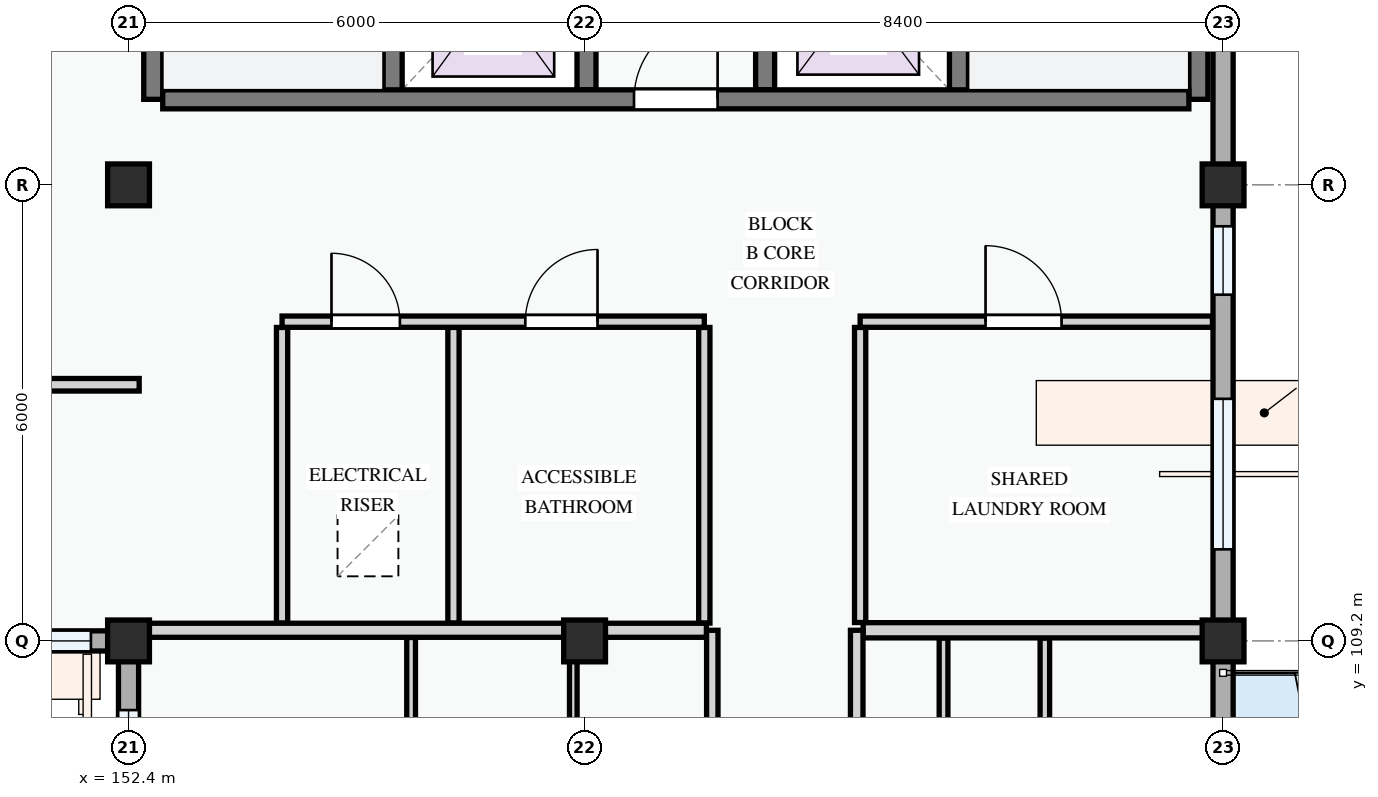
"""IFC4 building model, lengths in metres.
Left out: names, types, materials, properties, quantities, classifications, styles, units other than length and angle.
Written with IfcOpenShell. Run it as: python <this file> out.ifc"""

import sys

from ifc_helpers import new_model, si_unit, direction, frame, frame_2d, origin, origin_2d, place, context, subcontext, project, spatial, rectangle, extrude, element, fill, save


model = new_model("IFC4")
c1 = context("Model", 3, precision=1e-05, world=origin(), true_north=direction((0.0, 1.0)))
c2 = subcontext(c1, "Body", "Model", "MODEL_VIEW")
j1 = project(units=[si_unit("LENGTHUNIT", "METRE"), si_unit("PLANEANGLEUNIT", "RADIAN")], contexts=[c1])
p1 = place(None, origin())
s1 = spatial("IfcSite", under=j1, at=p1, CompositionType="ELEMENT")
p2 = place(p1, origin())
s2 = spatial("IfcBuilding", under=s1, at=p2, CompositionType="ELEMENT")
p3 = place(p2, frame((0.0, 0.0, 31.2)))
s3 = spatial("IfcBuildingStorey", under=s2, at=p3, CompositionType="ELEMENT", Elevation=31.2)
for number, where, z_axis, x_axis in (
    (1, (152.4, 109.2, 0.0), (0.0, 0.0, 1.0), (1.0, 0.0, 0.0)),
    (2, (152.4, 115.2, 0.0), (0.0, 0.0, 1.0), (1.0, 0.0, 0.0)),
    (3, (158.4, 109.2, 0.0), (0.0, 0.0, 1.0), (1.0, 0.0, 0.0)),
    (4, (166.8, 109.2, 0.0), (0.0, 0.0, 1.0), (1.0, 0.0, 0.0)),
    (5, (166.8, 115.2, 0.0), (0.0, 0.0, 1.0), (1.0, 0.0, 0.0)),
):
    element("IfcColumn", number, at=place(p3, frame(where, z_axis=z_axis, x_axis=x_axis)), inside=s3, PredefinedType="COLUMN", context=c2, shape_type="SweptSolid", body=[
        extrude(rectangle(XDim=0.55, YDim=0.55, at=origin_2d()), origin(), (0.0, 0.0, 1.0), 3.3),
    ])
p4 = place(p3, frame((166.8, 109.2, 0.0), z_axis=(0.0, 0.0, 1.0), x_axis=(0.0, 1.0, 0.0)))
e6 = element("IfcWall", 6, at=p4, inside=s3, PredefinedType="STANDARD", context=c2, shape_type="SweptSolid", body=[
    extrude(rectangle(XDim=6.0, YDim=0.265, at=frame_2d((3.0, 0.0))), origin(), (0.0, 0.0, 1.0), 2.575),
])
p5 = place(p4, frame((1.205, 0.0, 0.78)))
e7 = element("IfcOpeningElement", 7, at=p5, cuts=e6, PredefinedType="OPENING", context=c2, shape_type="SweptSolid", body=[
    extrude(rectangle(XDim=1.98, YDim=1.5, at=frame_2d((0.99, 0.75))), frame((0.0, 0.143, 0.0), z_axis=(0.0, -1.0, 0.0), x_axis=(1.0, 0.0, 0.0)), (0.0, 0.0, 1.0), 0.285),
])
p6 = place(p4, frame((4.555, 0.0, 0.78)))
e8 = element("IfcOpeningElement", 8, at=p6, cuts=e6, PredefinedType="OPENING", context=c2, shape_type="SweptSolid", body=[
    extrude(rectangle(XDim=0.9, YDim=1.2, at=frame_2d((0.45, 0.6))), frame((0.0, 0.143, 0.0), z_axis=(0.0, -1.0, 0.0), x_axis=(1.0, 0.0, 0.0)), (0.0, 0.0, 1.0), 0.285),
])
p7 = place(p3, frame((166.8, 115.2, 0.0), z_axis=(0.0, 0.0, 1.0), x_axis=(0.0, 1.0, 0.0)))
e9 = element("IfcWall", 9, at=p7, inside=s3, PredefinedType="STANDARD", context=c2, shape_type="SweptSolid", body=[
    extrude(rectangle(XDim=8.4, YDim=0.265, at=frame_2d((4.2, 0.0))), origin(), (0.0, 0.0, 1.0), 2.425),
])
p8 = place(p7, frame((1.911, 0.0, 0.78)))
e10 = element("IfcOpeningElement", 10, at=p8, cuts=e9, PredefinedType="OPENING", context=c2, shape_type="SweptSolid", body=[
    extrude(rectangle(XDim=2.04, YDim=1.46, at=frame_2d((1.02, 0.73))), frame((0.0, 0.143, 0.0), z_axis=(0.0, -1.0, 0.0), x_axis=(1.0, 0.0, 0.0)), (0.0, 0.0, 1.0), 0.285),
])
p9 = place(p7, frame((5.214, 0.0, 0.78)))
e11 = element("IfcOpeningElement", 11, at=p9, cuts=e9, PredefinedType="OPENING", context=c2, shape_type="SweptSolid", body=[
    extrude(rectangle(XDim=2.38, YDim=1.48, at=frame_2d((1.19, 0.74))), frame((0.0, 0.143, 0.0), z_axis=(0.0, -1.0, 0.0), x_axis=(1.0, 0.0, 0.0)), (0.0, 0.0, 1.0), 0.285),
])
p10 = place(p3, frame((144.0, 109.2, 0.0), z_axis=(0.0, 0.0, 1.0), x_axis=(1.0, 0.0, 0.0)))
e12 = element("IfcWall", 12, at=p10, inside=s3, PredefinedType="STANDARD", context=c2, shape_type="SweptSolid", body=[
    extrude(rectangle(XDim=8.4, YDim=0.265, at=frame_2d((4.2, 0.0))), origin(), (0.0, 0.0, 1.0), 2.375),
])
p11 = place(p10, frame((1.04, 0.0, 0.78)))
e13 = element("IfcOpeningElement", 13, at=p11, cuts=e12, PredefinedType="OPENING", context=c2, shape_type="SweptSolid", body=[
    extrude(rectangle(XDim=1.3, YDim=1.4, at=frame_2d((0.65, 0.7))), frame((0.0, 0.143, 0.0), z_axis=(0.0, -1.0, 0.0), x_axis=(1.0, 0.0, 0.0)), (0.0, 0.0, 1.0), 0.285),
])
p12 = place(p10, frame((3.925, 0.0, 0.78)))
e14 = element("IfcOpeningElement", 14, at=p12, cuts=e12, PredefinedType="OPENING", context=c2, shape_type="SweptSolid", body=[
    extrude(rectangle(XDim=1.25, YDim=1.3, at=frame_2d((0.625, 0.65))), frame((0.0, 0.143, 0.0), z_axis=(0.0, -1.0, 0.0), x_axis=(1.0, 0.0, 0.0)), (0.0, 0.0, 1.0), 0.285),
])
p13 = place(p10, frame((6.355, 0.0, 0.78)))
e15 = element("IfcOpeningElement", 15, at=p13, cuts=e12, PredefinedType="OPENING", context=c2, shape_type="SweptSolid", body=[
    extrude(rectangle(XDim=1.55, YDim=1.4, at=frame_2d((0.775, 0.7))), frame((0.0, 0.143, 0.0), z_axis=(0.0, -1.0, 0.0), x_axis=(1.0, 0.0, 0.0)), (0.0, 0.0, 1.0), 0.285),
])
p14 = place(p3, frame((152.4, 109.2, 0.0), z_axis=(0.0, 0.0, 1.0), x_axis=(0.0, -1.0, 0.0)))
e16 = element("IfcWall", 16, at=p14, inside=s3, PredefinedType="STANDARD", context=c2, shape_type="SweptSolid", body=[
    extrude(rectangle(XDim=8.4, YDim=0.265, at=frame_2d((4.2, 0.0))), origin(), (0.0, 0.0, 1.0), 2.425),
])
p15 = place(p14, frame((0.91, 0.0, 0.78)))
e17 = element("IfcOpeningElement", 17, at=p15, cuts=e16, PredefinedType="OPENING", context=c2, shape_type="SweptSolid", body=[
    extrude(rectangle(XDim=1.05, YDim=1.2, at=frame_2d((0.525, 0.6))), frame((0.0, 0.143, 0.0), z_axis=(0.0, -1.0, 0.0), x_axis=(1.0, 0.0, 0.0)), (0.0, 0.0, 1.0), 0.285),
])
p16 = place(p14, frame((3.045, 0.0, 0.78)))
e18 = element("IfcOpeningElement", 18, at=p16, cuts=e16, PredefinedType="OPENING", context=c2, shape_type="SweptSolid", body=[
    extrude(rectangle(XDim=1.48, YDim=1.52, at=frame_2d((0.74, 0.76))), frame((0.0, 0.143, 0.0), z_axis=(0.0, -1.0, 0.0), x_axis=(1.0, 0.0, 0.0)), (0.0, 0.0, 1.0), 0.285),
])
p17 = place(p14, frame((5.995, 0.0, 0.78)))
e19 = element("IfcOpeningElement", 19, at=p17, cuts=e16, PredefinedType="OPENING", context=c2, shape_type="SweptSolid", body=[
    extrude(rectangle(XDim=1.25, YDim=1.45, at=frame_2d((0.625, 0.725))), frame((0.0, 0.143, 0.0), z_axis=(0.0, -1.0, 0.0), x_axis=(1.0, 0.0, 0.0)), (0.0, 0.0, 1.0), 0.285),
])
p18 = place(p3, frame((166.8, 100.8, 0.0), z_axis=(0.0, 0.0, 1.0), x_axis=(0.0, 1.0, 0.0)))
e20 = element("IfcWall", 20, at=p18, inside=s3, PredefinedType="STANDARD", context=c2, shape_type="SweptSolid", body=[
    extrude(rectangle(XDim=8.4, YDim=0.265, at=frame_2d((4.2, 0.0))), origin(), (0.0, 0.0, 1.0), 2.425),
])
p19 = place(p18, frame((3.493, 0.0, 0.0)))
e21 = element("IfcOpeningElement", 21, at=p19, cuts=e20, PredefinedType="OPENING", context=c2, shape_type="SweptSolid", body=[
    extrude(rectangle(XDim=1.05, YDim=2.15, at=frame_2d((0.525, 1.075))), frame((0.0, 0.143, 0.0), z_axis=(0.0, -1.0, 0.0), x_axis=(1.0, 0.0, 0.0)), (0.0, 0.0, 1.0), 0.285),
])
p20 = place(p18, frame((1.152, 0.0, 0.78)))
e22 = element("IfcOpeningElement", 22, at=p20, cuts=e20, PredefinedType="OPENING", context=c2, shape_type="SweptSolid", body=[
    extrude(rectangle(XDim=1.05, YDim=1.2, at=frame_2d((0.525, 0.6))), frame((0.0, 0.143, 0.0), z_axis=(0.0, -1.0, 0.0), x_axis=(1.0, 0.0, 0.0)), (0.0, 0.0, 1.0), 0.285),
])
p21 = place(p18, frame((5.492, 0.0, 0.78)))
e23 = element("IfcOpeningElement", 23, at=p21, cuts=e20, PredefinedType="OPENING", context=c2, shape_type="SweptSolid", body=[
    extrude(rectangle(XDim=1.82, YDim=1.46, at=frame_2d((0.91, 0.73))), frame((0.0, 0.143, 0.0), z_axis=(0.0, -1.0, 0.0), x_axis=(1.0, 0.0, 0.0)), (0.0, 0.0, 1.0), 0.285),
])
p22 = place(p3, frame((155.875, 123.25, 0.0), z_axis=(0.0, 0.0, 1.0), x_axis=(0.0, -1.0, 0.0)))
e24 = element("IfcWall", 24, at=p22, inside=s3, PredefinedType="SHEAR", context=c2, shape_type="SweptSolid", body=[
    extrude(rectangle(XDim=6.925, YDim=0.25, at=frame_2d((3.462, 0.0))), origin(), (0.0, 0.0, 1.0), 3.0),
])
p23 = place(p22, frame((0.35, 0.0, 0.0)))
e25 = element("IfcOpeningElement", 25, at=p23, cuts=e24, PredefinedType="OPENING", context=c2, shape_type="SweptSolid", body=[
    extrude(rectangle(XDim=0.95, YDim=2.1, at=frame_2d((0.475, 1.05))), frame((0.0, 0.135, 0.0), z_axis=(0.0, -1.0, 0.0), x_axis=(1.0, 0.0, 0.0)), (0.0, 0.0, 1.0), 0.27),
])
p24 = place(p3, frame((152.725, 123.4, 0.0), z_axis=(0.0, 0.0, 1.0), x_axis=(0.0, -1.0, 0.0)))
e26 = element("IfcWall", 26, at=p24, inside=s3, PredefinedType="SHEAR", context=c2, shape_type="SweptSolid", body=[
    extrude(rectangle(XDim=7.075, YDim=0.25, at=frame_2d((3.538, 0.0))), origin(), (0.0, 0.0, 1.0), 3.0),
])
p25 = place(p3, frame((166.475, 123.25, 0.0), z_axis=(0.0, 0.0, 1.0), x_axis=(0.0, -1.0, 0.0)))
e27 = element("IfcWall", 27, at=p25, inside=s3, PredefinedType="SHEAR", context=c2, shape_type="SweptSolid", body=[
    extrude(rectangle(XDim=6.925, YDim=0.25, at=frame_2d((3.462, 0.0))), origin(), (0.0, 0.0, 1.0), 3.0),
])
p26 = place(p3, frame((163.325, 123.25, 0.0), z_axis=(0.0, 0.0, 1.0), x_axis=(0.0, -1.0, 0.0)))
e28 = element("IfcWall", 28, at=p26, inside=s3, PredefinedType="SHEAR", context=c2, shape_type="SweptSolid", body=[
    extrude(rectangle(XDim=6.925, YDim=0.25, at=frame_2d((3.462, 0.0))), origin(), (0.0, 0.0, 1.0), 3.0),
])
p27 = place(p26, frame((0.35, 0.0, 0.0)))
e29 = element("IfcOpeningElement", 29, at=p27, cuts=e28, PredefinedType="OPENING", context=c2, shape_type="SweptSolid", body=[
    extrude(rectangle(XDim=0.95, YDim=2.1, at=frame_2d((0.475, 1.05))), frame((0.0, 0.135, 0.0), z_axis=(0.0, -1.0, 0.0), x_axis=(1.0, 0.0, 0.0)), (0.0, 0.0, 1.0), 0.27),
])
for number, where, z_axis, x_axis in (
    (30, (158.425, 118.875, 0.0), (0.0, 0.0, 1.0), (0.0, -1.0, 0.0)),
    (31, (160.775, 118.875, 0.0), (0.0, 0.0, 1.0), (0.0, -1.0, 0.0)),
):
    element("IfcWall", number, at=place(p3, frame(where, z_axis=z_axis, x_axis=x_axis)), inside=s3, PredefinedType="SHEAR", context=c2, shape_type="SweptSolid", body=[
        extrude(rectangle(XDim=2.425, YDim=0.25, at=frame_2d((1.212, 0.0))), origin(), (0.0, 0.0, 1.0), 3.0),
    ])
p28 = place(p3, frame((152.85, 116.325, 0.0), z_axis=(0.0, 0.0, 1.0), x_axis=(1.0, 0.0, 0.0)))
e32 = element("IfcWall", 32, at=p28, inside=s3, PredefinedType="SHEAR", context=c2, shape_type="SweptSolid", body=[
    extrude(rectangle(XDim=13.5, YDim=0.25, at=frame_2d((6.75, 0.0))), origin(), (0.0, 0.0, 1.0), 3.0),
])
p29 = place(p28, frame((6.2, 0.0, 0.0)))
e33 = element("IfcOpeningElement", 33, at=p29, cuts=e32, PredefinedType="OPENING", context=c2, shape_type="SweptSolid", body=[
    extrude(rectangle(XDim=1.1, YDim=2.15, at=frame_2d((0.55, 1.075))), frame((0.0, 0.135, 0.0), z_axis=(0.0, -1.0, 0.0), x_axis=(1.0, 0.0, 0.0)), (0.0, 0.0, 1.0), 0.27),
])
for number, where, z_axis, x_axis in (
    (34, (154.42, 113.324, 0.0), (0.0, 0.0, 1.0), (0.0, -1.0, 0.0)),
    (35, (156.675, 113.324, 0.0), (0.0, 0.0, 1.0), (0.0, -1.0, 0.0)),
    (36, (159.975, 113.324, 0.0), (0.0, 0.0, 1.0), (0.0, -1.0, 0.0)),
):
    element("IfcWall", number, at=place(p3, frame(where, z_axis=z_axis, x_axis=x_axis)), inside=s3, PredefinedType="PARTITIONING", context=c2, shape_type="SweptSolid", body=[
        extrude(rectangle(XDim=3.889, YDim=0.148, at=frame_2d((1.945, 0.0))), origin(), (0.0, 0.0, 1.0), 3.0),
    ])
p30 = place(p3, frame((162.025, 113.324, 0.0), z_axis=(0.0, 0.0, 1.0), x_axis=(0.0, -1.0, 0.0)))
e37 = element("IfcWall", 37, at=p30, inside=s3, PredefinedType="PARTITIONING", context=c2, shape_type="SweptSolid", body=[
    extrude(rectangle(XDim=3.882, YDim=0.148, at=frame_2d((1.941, 0.0))), origin(), (0.0, 0.0, 1.0), 3.0),
])
p31 = place(p3, frame((154.42, 113.4, 0.0), z_axis=(0.0, 0.0, 1.0), x_axis=(1.0, 0.0, 0.0)))
e38 = element("IfcWall", 38, at=p31, inside=s3, PredefinedType="PARTITIONING", context=c2, shape_type="SweptSolid", body=[
    extrude(rectangle(XDim=5.555, YDim=0.148, at=frame_2d((2.778, 0.0))), origin(), (0.0, 0.0, 1.0), 3.0),
])
p32 = place(p31, frame((0.65, 0.0, 0.0)))
e39 = element("IfcOpeningElement", 39, at=p32, cuts=e38, PredefinedType="OPENING", context=c2, shape_type="SweptSolid", body=[
    extrude(rectangle(XDim=0.9, YDim=2.1, at=frame_2d((0.45, 1.05))), frame((0.0, 0.084, 0.0), z_axis=(0.0, -1.0, 0.0), x_axis=(1.0, 0.0, 0.0)), (0.0, 0.0, 1.0), 0.168),
])
p33 = place(p31, frame((3.2, 0.0, 0.0)))
e40 = element("IfcOpeningElement", 40, at=p33, cuts=e38, PredefinedType="OPENING", context=c2, shape_type="SweptSolid", body=[
    extrude(rectangle(XDim=0.95, YDim=2.1, at=frame_2d((0.475, 1.05))), frame((0.0, 0.084, 0.0), z_axis=(0.0, -1.0, 0.0), x_axis=(1.0, 0.0, 0.0)), (0.0, 0.0, 1.0), 0.168),
])
p34 = place(p3, frame((162.025, 113.4, 0.0), z_axis=(0.0, 0.0, 1.0), x_axis=(1.0, 0.0, 0.0)))
e41 = element("IfcWall", 41, at=p34, inside=s3, PredefinedType="PARTITIONING", context=c2, shape_type="SweptSolid", body=[
    extrude(rectangle(XDim=4.635, YDim=0.148, at=frame_2d((2.317, 0.0))), origin(), (0.0, 0.0, 1.0), 3.0),
])
p35 = place(p34, frame((1.65, 0.0, 0.0)))
e42 = element("IfcOpeningElement", 42, at=p35, cuts=e41, PredefinedType="OPENING", context=c2, shape_type="SweptSolid", body=[
    extrude(rectangle(XDim=1.0, YDim=2.15, at=frame_2d((0.5, 1.075))), frame((0.0, 0.084, 0.0), z_axis=(0.0, -1.0, 0.0), x_axis=(1.0, 0.0, 0.0)), (0.0, 0.0, 1.0), 0.168),
])
p36 = place(p3, frame((150.127, 112.57, 0.0), z_axis=(0.0, 0.0, 1.0), x_axis=(1.0, 0.0, 0.0)))
e43 = element("IfcWall", 43, at=p36, inside=s3, PredefinedType="PARTITIONING", context=c2, shape_type="SweptSolid", body=[
    extrude(rectangle(XDim=2.413, YDim=0.165, at=frame_2d((1.207, 0.0))), origin(), (0.0, 0.0, 1.0), 3.0),
])
p37 = place(p3, frame((156.118, 104.235, 0.0), z_axis=(0.0, 0.0, 1.0), x_axis=(0.0, 1.0, 0.0)))
e44 = element("IfcWall", 44, at=p37, inside=s3, PredefinedType="PARTITIONING", context=c2, shape_type="SweptSolid", body=[
    extrude(rectangle(XDim=5.011, YDim=0.115, at=frame_2d((2.505, 0.0))), origin(), (0.0, 0.0, 1.0), 3.0),
])
p38 = place(p3, frame((158.251, 104.235, 0.0), z_axis=(0.0, 0.0, 1.0), x_axis=(0.0, 1.0, 0.0)))
e45 = element("IfcWall", 45, at=p38, inside=s3, PredefinedType="PARTITIONING", context=c2, shape_type="SweptSolid", body=[
    extrude(rectangle(XDim=5.011, YDim=0.1, at=frame_2d((2.505, 0.0))), origin(), (0.0, 0.0, 1.0), 2.425),
])
p39 = place(p3, frame((164.455, 104.035, 0.0), z_axis=(0.0, 0.0, 1.0), x_axis=(0.0, 1.0, 0.0)))
e46 = element("IfcWall", 46, at=p39, inside=s3, PredefinedType="PARTITIONING", context=c2, shape_type="SweptSolid", body=[
    extrude(rectangle(XDim=5.203, YDim=0.125, at=frame_2d((2.602, 0.0))), origin(), (0.0, 0.0, 1.0), 3.0),
])
p40 = place(p3, frame((163.122, 104.035, 0.0), z_axis=(0.0, 0.0, 1.0), x_axis=(0.0, 1.0, 0.0)))
e47 = element("IfcWall", 47, at=p40, inside=s3, PredefinedType="PARTITIONING", context=c2, shape_type="SweptSolid", body=[
    extrude(rectangle(XDim=5.203, YDim=0.115, at=frame_2d((2.602, 0.0))), origin(), (0.0, 0.0, 1.0), 3.0),
])
p41 = place(p3, frame((152.46, 109.34, 0.0), z_axis=(0.0, 0.0, 1.0), x_axis=(1.0, 0.0, 0.0)))
e48 = element("IfcWall", 48, at=p41, inside=s3, PredefinedType="PARTITIONING", context=c2, shape_type="SweptSolid", body=[
    extrude(rectangle(XDim=7.543, YDim=0.185, at=frame_2d((3.771, 0.0))), origin(), (0.0, 0.0, 1.0), 2.375),
])
p42 = place(p3, frame((162.064, 109.34, 0.0), z_axis=(0.0, 0.0, 1.0), x_axis=(1.0, 0.0, 0.0)))
e49 = element("IfcWall", 49, at=p42, inside=s3, PredefinedType="PARTITIONING", context=c2, shape_type="SweptSolid", body=[
    extrude(rectangle(XDim=4.601, YDim=0.2, at=frame_2d((2.301, 0.0))), origin(), (0.0, 0.0, 1.0), 2.375),
])
p43 = place(p3, frame((160.08, 80.46, 0.0), z_axis=(0.0, 0.0, 1.0), x_axis=(0.0, 1.0, 0.0)))
e50 = element("IfcWall", 50, at=p43, inside=s3, PredefinedType="PARTITIONING", context=c2, shape_type="SweptSolid", body=[
    extrude(rectangle(XDim=28.88, YDim=0.15, at=frame_2d((14.44, 0.0))), origin(), (0.0, 0.0, 1.0), 3.0),
])
p44 = place(p43, frame((2.484, 0.0, 0.0)))
e51 = element("IfcOpeningElement", 51, at=p44, cuts=e50, PredefinedType="OPENING", context=c2, shape_type="SweptSolid", body=[
    extrude(rectangle(XDim=0.92, YDim=2.1, at=frame_2d((0.46, 1.05))), frame((0.0, 0.085, 0.0), z_axis=(0.0, -1.0, 0.0), x_axis=(1.0, 0.0, 0.0)), (0.0, 0.0, 1.0), 0.17),
])
p45 = place(p43, frame((10.07, 0.0, 0.0)))
e52 = element("IfcOpeningElement", 52, at=p45, cuts=e50, PredefinedType="OPENING", context=c2, shape_type="SweptSolid", body=[
    extrude(rectangle(XDim=0.96, YDim=2.12, at=frame_2d((0.48, 1.06))), frame((0.0, 0.085, 0.0), z_axis=(0.0, -1.0, 0.0), x_axis=(1.0, 0.0, 0.0)), (0.0, 0.0, 1.0), 0.17),
])
p46 = place(p43, frame((22.5, 0.0, 0.0)))
e53 = element("IfcOpeningElement", 53, at=p46, cuts=e50, PredefinedType="OPENING", context=c2, shape_type="SweptSolid", body=[
    extrude(rectangle(XDim=0.92, YDim=2.1, at=frame_2d((0.46, 1.05))), frame((0.0, 0.085, 0.0), z_axis=(0.0, -1.0, 0.0), x_axis=(1.0, 0.0, 0.0)), (0.0, 0.0, 1.0), 0.17),
])
p47 = place(p3, frame((161.98, 80.46, 0.0), z_axis=(0.0, 0.0, 1.0), x_axis=(0.0, 1.0, 0.0)))
e54 = element("IfcWall", 54, at=p47, inside=s3, PredefinedType="PARTITIONING", context=c2, shape_type="SweptSolid", body=[
    extrude(rectangle(XDim=28.88, YDim=0.165, at=frame_2d((14.44, 0.0))), origin(), (0.0, 0.0, 1.0), 3.0),
])
p48 = place(p47, frame((2.487, 0.0, 0.0)))
e55 = element("IfcOpeningElement", 55, at=p48, cuts=e54, PredefinedType="OPENING", context=c2, shape_type="SweptSolid", body=[
    extrude(rectangle(XDim=0.92, YDim=2.1, at=frame_2d((0.46, 1.05))), frame((0.0, 0.093, 0.0), z_axis=(0.0, -1.0, 0.0), x_axis=(1.0, 0.0, 0.0)), (0.0, 0.0, 1.0), 0.185),
])
p49 = place(p47, frame((10.07, 0.0, 0.0)))
e56 = element("IfcOpeningElement", 56, at=p49, cuts=e54, PredefinedType="OPENING", context=c2, shape_type="SweptSolid", body=[
    extrude(rectangle(XDim=0.92, YDim=2.1, at=frame_2d((0.46, 1.05))), frame((0.0, 0.093, 0.0), z_axis=(0.0, -1.0, 0.0), x_axis=(1.0, 0.0, 0.0)), (0.0, 0.0, 1.0), 0.185),
])
p50 = place(p47, frame((22.293, 0.0, 0.0)))
e57 = element("IfcOpeningElement", 57, at=p50, cuts=e54, PredefinedType="OPENING", context=c2, shape_type="SweptSolid", body=[
    extrude(rectangle(XDim=0.92, YDim=2.1, at=frame_2d((0.46, 1.05))), frame((0.0, 0.093, 0.0), z_axis=(0.0, -1.0, 0.0), x_axis=(1.0, 0.0, 0.0)), (0.0, 0.0, 1.0), 0.185),
])
p51 = place(p5, origin())
e58 = element("IfcWindow", 58, at=p51, inside=s3, PartitioningType="DOUBLE_PANEL_VERTICAL", PredefinedType="WINDOW", context=c2, shape_type="SweptSolid", body=[
    extrude(rectangle(XDim=1.98, YDim=1.5, at=frame_2d((0.99, 0.75))), frame((0.0, 0.03, 0.0), z_axis=(0.0, -1.0, 0.0), x_axis=(1.0, 0.0, 0.0)), (0.0, 0.0, 1.0), 0.06),
])
fill(e7, e58)
p52 = place(p6, origin())
e59 = element("IfcWindow", 59, at=p52, inside=s3, PartitioningType="SINGLE_PANEL", PredefinedType="WINDOW", context=c2, shape_type="SweptSolid", body=[
    extrude(rectangle(XDim=0.9, YDim=1.2, at=frame_2d((0.45, 0.6))), frame((0.0, 0.03, 0.0), z_axis=(0.0, -1.0, 0.0), x_axis=(1.0, 0.0, 0.0)), (0.0, 0.0, 1.0), 0.06),
])
fill(e8, e59)
p53 = place(p13, origin())
e60 = element("IfcWindow", 60, at=p53, inside=s3, PartitioningType="SINGLE_PANEL", PredefinedType="WINDOW", context=c2, shape_type="SweptSolid", body=[
    extrude(rectangle(XDim=1.55, YDim=1.4, at=frame_2d((0.775, 0.7))), frame((0.0, 0.03, 0.0), z_axis=(0.0, -1.0, 0.0), x_axis=(1.0, 0.0, 0.0)), (0.0, 0.0, 1.0), 0.06),
])
fill(e15, e60)
p54 = place(p15, origin())
e61 = element("IfcWindow", 61, at=p54, inside=s3, PartitioningType="SINGLE_PANEL", PredefinedType="WINDOW", context=c2, shape_type="SweptSolid", body=[
    extrude(rectangle(XDim=1.05, YDim=1.2, at=frame_2d((0.525, 0.6))), frame((0.0, 0.03, 0.0), z_axis=(0.0, -1.0, 0.0), x_axis=(1.0, 0.0, 0.0)), (0.0, 0.0, 1.0), 0.06),
])
fill(e17, e61)
p55 = place(p29, origin())
e62 = element("IfcDoor", 62, at=p55, inside=s3, OperationType="SINGLE_SWING_RIGHT", PredefinedType="DOOR", context=c2, shape_type="SweptSolid", body=[
    extrude(rectangle(XDim=1.1, YDim=2.15, at=frame_2d((0.55, 1.075))), frame((0.0, 0.025, 0.0), z_axis=(0.0, -1.0, 0.0), x_axis=(1.0, 0.0, 0.0)), (0.0, 0.0, 1.0), 0.05),
])
fill(e33, e62)
p56 = place(p32, origin())
e63 = element("IfcDoor", 63, at=p56, inside=s3, OperationType="SINGLE_SWING_LEFT", PredefinedType="DOOR", context=c2, shape_type="SweptSolid", body=[
    extrude(rectangle(XDim=0.9, YDim=2.1, at=frame_2d((0.45, 1.05))), frame((0.0, 0.025, 0.0), z_axis=(0.0, -1.0, 0.0), x_axis=(1.0, 0.0, 0.0)), (0.0, 0.0, 1.0), 0.05),
])
fill(e39, e63)
p57 = place(p33, origin())
e64 = element("IfcDoor", 64, at=p57, inside=s3, OperationType="SINGLE_SWING_RIGHT", PredefinedType="DOOR", context=c2, shape_type="SweptSolid", body=[
    extrude(rectangle(XDim=0.95, YDim=2.1, at=frame_2d((0.475, 1.05))), frame((0.0, 0.025, 0.0), z_axis=(0.0, -1.0, 0.0), x_axis=(1.0, 0.0, 0.0)), (0.0, 0.0, 1.0), 0.05),
])
fill(e40, e64)
p58 = place(p35, origin())
e65 = element("IfcDoor", 65, at=p58, inside=s3, OperationType="SINGLE_SWING_LEFT", PredefinedType="DOOR", context=c2, shape_type="SweptSolid", body=[
    extrude(rectangle(XDim=1.0, YDim=2.15, at=frame_2d((0.5, 1.075))), frame((0.0, 0.025, 0.0), z_axis=(0.0, -1.0, 0.0), x_axis=(1.0, 0.0, 0.0)), (0.0, 0.0, 1.0), 0.05),
])
fill(e42, e65)
save(model, sys.argv[1])
